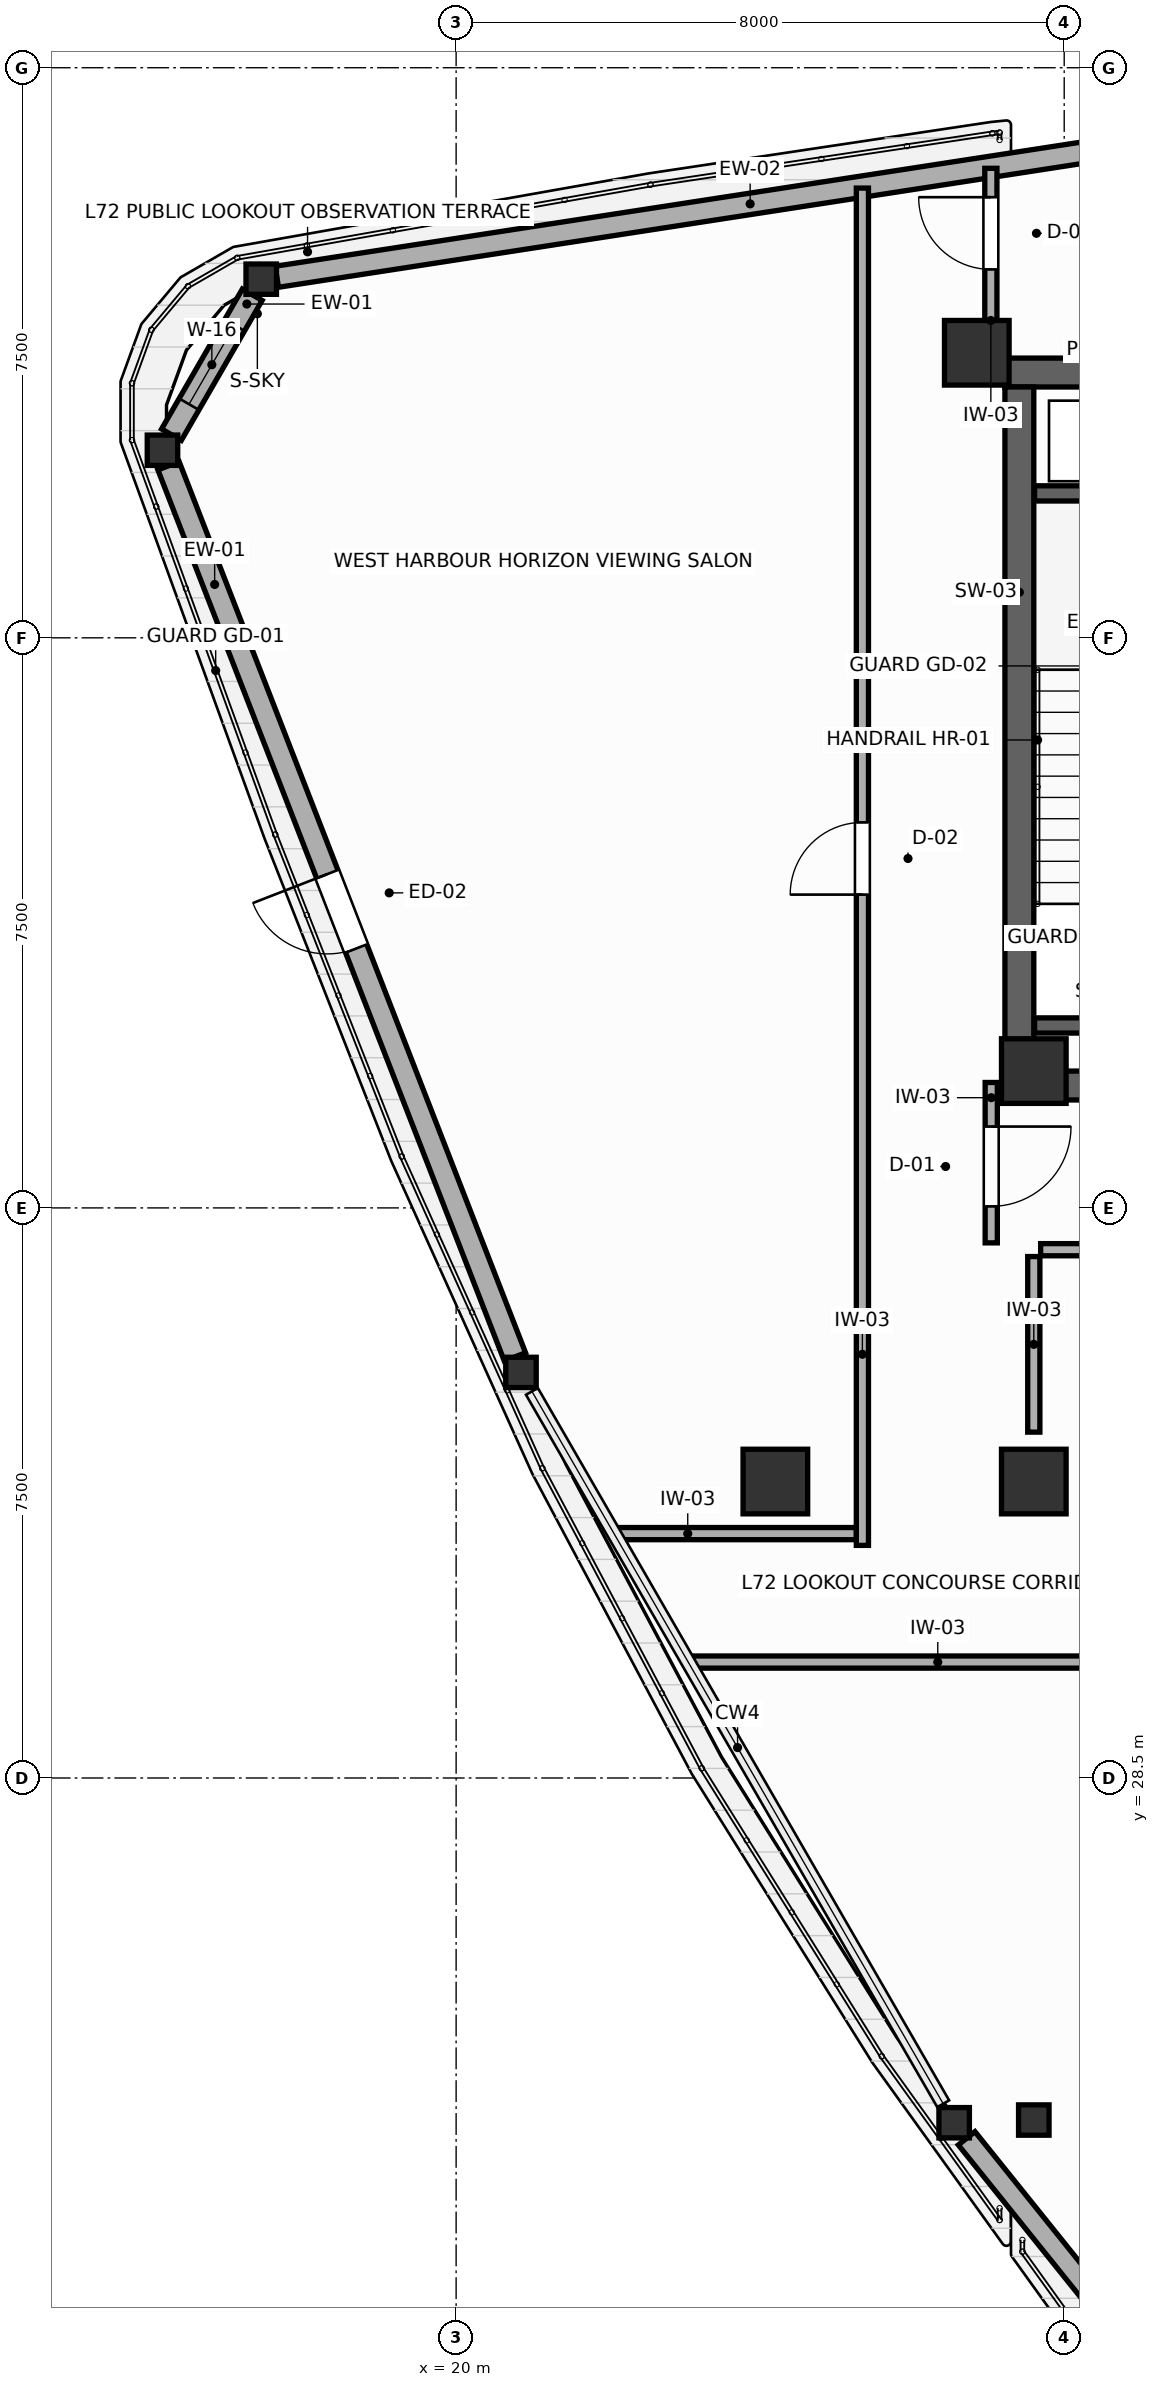
"""IFC4 building model, lengths in metres.
Left out: names, types, materials, properties, quantities, classifications, styles, units other than length and angle.
Written with IfcOpenShell. Run it as: python <this file> out.ifc"""

import sys

from ifc_helpers import new_model, si_unit, direction, frame, frame_2d, origin, origin_2d, place, context, subcontext, project, spatial, rectangle, i_section, extrude, source, transform, mapped, element, fill, save


model = new_model("IFC4")
c1 = context("Model", 3, precision=1e-05, world=origin(), true_north=direction((0.0, 1.0)))
c2 = subcontext(c1, "Body", "Model", "MODEL_VIEW")
j1 = project(units=[si_unit("LENGTHUNIT", "METRE"), si_unit("PLANEANGLEUNIT", "RADIAN")], contexts=[c1])
p1 = place(None, origin())
s1 = spatial("IfcSite", under=j1, at=p1, CompositionType="ELEMENT")
p2 = place(p1, origin())
s2 = spatial("IfcBuilding", under=s1, at=p2, CompositionType="ELEMENT")
p3 = place(p2, frame((0.0, 0.0, 275.4)))
s3 = spatial("IfcBuildingStorey", under=s2, at=p3, CompositionType="ELEMENT", Elevation=275.4)
p4 = place(p3, frame((27.22, 46.99, 0.0), z_axis=(0.0, 0.0, 1.0), x_axis=(1.0, 0.0, 0.0)))
e1 = element("IfcWall", 1, at=p4, inside=s3, PredefinedType="SHEAR", context=c2, shape_type="SweptSolid", body=[
    extrude(rectangle(XDim=17.56, YDim=0.38, at=frame_2d((8.78, 0.0))), origin(), (0.0, 0.0, 1.0), 4.2),
])
p5 = place(p3, frame((27.22, 37.61, 0.0), z_axis=(0.0, 0.0, 1.0), x_axis=(1.0, 0.0, 0.0)))
e2 = element("IfcWall", 2, at=p5, inside=s3, PredefinedType="SHEAR", context=c2, shape_type="SweptSolid", body=[
    extrude(rectangle(XDim=17.56, YDim=0.38, at=frame_2d((8.78, 0.0))), origin(), (0.0, 0.0, 1.0), 4.2),
])
p6 = place(p5, frame((4.805, 0.0, 0.0)))
e3 = element("IfcOpeningElement", 3, at=p6, cuts=e2, PredefinedType="OPENING", context=c2, shape_type="SweptSolid", body=[
    extrude(rectangle(XDim=1.05, YDim=2.1, at=frame_2d((0.525, 1.05))), frame((0.0, 0.2, 0.0), z_axis=(0.0, -1.0, 0.0), x_axis=(1.0, 0.0, 0.0)), (0.0, 0.0, 1.0), 0.4),
])
p7 = place(p5, frame((11.705, 0.0, 0.0)))
e4 = element("IfcOpeningElement", 4, at=p7, cuts=e2, PredefinedType="OPENING", context=c2, shape_type="SweptSolid", body=[
    extrude(rectangle(XDim=1.05, YDim=2.1, at=frame_2d((0.525, 1.05))), frame((0.0, 0.2, 0.0), z_axis=(0.0, -1.0, 0.0), x_axis=(1.0, 0.0, 0.0)), (0.0, 0.0, 1.0), 0.4),
])
p8 = place(p3, frame((27.41, 37.8, 0.0), z_axis=(0.0, 0.0, 1.0), x_axis=(0.0, 1.0, 0.0)))
e5 = element("IfcWall", 5, at=p8, inside=s3, PredefinedType="SHEAR", context=c2, shape_type="SweptSolid", body=[
    extrude(rectangle(XDim=9.0, YDim=0.38, at=frame_2d((4.5, 0.0))), origin(), (0.0, 0.0, 1.0), 4.2),
])
m1 = source(origin(), c2, "Body", "SweptSolid", [
    extrude(rectangle(XDim=0.85, YDim=0.85, at=origin_2d()), origin(), (0.0, 0.0, 1.0), 4.2),
])
for number, where, z_axis, x_axis in (
    (6, (26.85, 47.25, 0.0), (0.0, 0.0, 1.0), (1.0, 0.0, 0.0)),
    (7, (27.6, 37.8, 0.0), (0.0, 0.0, 1.0), (1.0, 0.0, 0.0)),
    (8, (27.6, 32.4, 0.0), (0.0, 0.0, 1.0), (1.0, 0.0, 0.0)),
    (9, (24.2, 32.4, 0.0), (0.0, 0.0, 1.0), (1.0, 0.0, 0.0)),
):
    element("IfcColumn", number, at=place(p3, frame(where, z_axis=z_axis, x_axis=x_axis)), inside=s3, PredefinedType="COLUMN", context=c2, shape_type="MappedRepresentation", body=[
        mapped(m1, transform((0.0, 0.0, 0.0), scale=1.0)),
    ])
m2 = source(origin(), c2, "Body", "SweptSolid", [
    extrude(i_section(OverallWidth=0.401, OverallDepth=0.399, WebThickness=0.022, FlangeThickness=0.036, FilletRadius=0.015, at=origin_2d()), origin(), (0.0, 0.0, 1.0), 4.2),
])
for number, where, z_axis, x_axis in (
    (10, (27.6, 24.0, 0.0), (0.0, 0.0, 1.0), (1.0, 0.0, 0.0)),
    (11, (17.436, 48.218, 0.0), (0.0, 0.0, 1.0), (1.0, 0.0, 0.0)),
    (12, (16.137, 45.968, 0.0), (0.0, 0.0, 1.0), (1.0, 0.0, 0.0)),
    (13, (20.853, 33.836, 0.0), (0.0, 0.0, 1.0), (1.0, 0.0, 0.0)),
    (14, (26.552, 23.965, 0.0), (0.0, 0.0, 1.0), (1.0, 0.0, 0.0)),
):
    element("IfcColumn", number, at=place(p3, frame(where, z_axis=z_axis, x_axis=x_axis)), inside=s3, PredefinedType="COLUMN", context=c2, shape_type="MappedRepresentation", body=[
        mapped(m2, transform((0.0, 0.0, 0.0), scale=1.0)),
    ])
p9 = place(p3, frame((30.095, 50.168, 0.0), z_axis=(0.0, 0.0, 1.0), x_axis=(-0.988345027655, -0.152230438186, 0.0)))
e15 = element("IfcWall", 15, at=p9, inside=s3, PredefinedType="SOLIDWALL", context=c2, shape_type="SweptSolid", body=[
    extrude(rectangle(XDim=12.601, YDim=0.28, at=frame_2d((6.3, 0.0))), origin(), (0.0, 0.0, 1.0), 2.52),
])
p10 = place(p3, frame((17.318, 48.014, 0.0), z_axis=(0.0, 0.0, 1.0), x_axis=(-0.499967640965, -0.866044085476, 0.0)))
e16 = element("IfcWall", 16, at=p10, inside=s3, PredefinedType="SOLIDWALL", context=c2, shape_type="SweptSolid", body=[
    extrude(rectangle(XDim=2.126, YDim=0.3, at=frame_2d((1.063, 0.0))), origin(), (0.0, 0.0, 1.0), 2.52),
])
p11 = place(p10, frame((0.463, 0.0, 0.75)))
e17 = element("IfcOpeningElement", 17, at=p11, cuts=e16, PredefinedType="OPENING", context=c2, shape_type="SweptSolid", body=[
    extrude(rectangle(XDim=1.2, YDim=1.55, at=frame_2d((0.6, 0.775))), frame((0.0, 0.16, 0.0), z_axis=(0.0, -1.0, 0.0), x_axis=(1.0, 0.0, 0.0)), (0.0, 0.0, 1.0), 0.32),
])
p12 = place(p3, frame((16.216, 45.763, 0.0), z_axis=(0.0, 0.0, 1.0), x_axis=(0.362340410402, -0.932045828803, 0.0)))
e18 = element("IfcWall", 18, at=p12, inside=s3, PredefinedType="SOLIDWALL", context=c2, shape_type="SweptSolid", body=[
    extrude(rectangle(XDim=12.578, YDim=0.3, at=frame_2d((6.289, 0.0))), origin(), (0.0, 0.0, 1.0), 2.52),
])
p13 = place(p12, frame((5.764, 0.0, 0.0)))
e19 = element("IfcOpeningElement", 19, at=p13, cuts=e18, PredefinedType="OPENING", context=c2, shape_type="SweptSolid", body=[
    extrude(rectangle(XDim=1.05, YDim=2.1, at=frame_2d((0.525, 1.05))), frame((0.0, 0.16, 0.0), z_axis=(0.0, -1.0, 0.0), x_axis=(1.0, 0.0, 0.0)), (0.0, 0.0, 1.0), 0.32),
])
p14 = place(p3, frame((26.716, 23.76, 0.0), z_axis=(0.0, 0.0, 1.0), x_axis=(0.626009756129, -0.779815225058, 0.0)))
e20 = element("IfcWall", 20, at=p14, inside=s3, PredefinedType="SOLIDWALL", context=c2, shape_type="SweptSolid", body=[
    extrude(rectangle(XDim=12.492, YDim=0.28, at=frame_2d((6.246, 0.0))), origin(), (0.0, 0.0, 1.0), 2.52),
])
for number, where, z_axis, x_axis in (
    (21, (27.61, 45.4, 0.0), (0.0, 0.0, 1.0), (1.0, 0.0, 0.0)),
    (22, (27.61, 38.4, 0.0), (0.0, 0.0, 1.0), (1.0, 0.0, 0.0)),
):
    element("IfcWall", number, at=place(p3, frame(where, z_axis=z_axis, x_axis=x_axis)), inside=s3, PredefinedType="SHEAR", context=c2, shape_type="SweptSolid", body=[
        extrude(rectangle(XDim=3.14, YDim=0.2, at=frame_2d((1.57, 0.0))), origin(), (0.0, 0.0, 1.0), 4.2),
    ])
p15 = place(p3, frame((27.6, 33.05, 0.0), z_axis=(0.0, 0.0, 1.0), x_axis=(0.0, 1.0, 0.0)))
e23 = element("IfcWall", 23, at=p15, inside=s3, PredefinedType="PARTITIONING", context=c2, shape_type="SweptSolid", body=[
    extrude(rectangle(XDim=2.31, YDim=0.16, at=frame_2d((1.155, 0.0))), origin(), (0.0, 0.0, 1.0), 3.96),
])
p16 = place(p3, frame((27.69, 35.45, 0.0), z_axis=(0.0, 0.0, 1.0), x_axis=(1.0, 0.0, 0.0)))
e24 = element("IfcWall", 24, at=p16, inside=s3, PredefinedType="PARTITIONING", context=c2, shape_type="SweptSolid", body=[
    extrude(rectangle(XDim=4.03, YDim=0.16, at=frame_2d((2.015, 0.0))), origin(), (0.0, 0.0, 1.0), 3.96),
])
p17 = place(p16, frame((1.35, 0.0, 0.0)))
e25 = element("IfcOpeningElement", 25, at=p17, cuts=e24, PredefinedType="OPENING", context=c2, shape_type="SweptSolid", body=[
    extrude(rectangle(XDim=0.95, YDim=2.05, at=frame_2d((0.475, 1.025))), frame((0.0, 0.09, 0.0), z_axis=(0.0, -1.0, 0.0), x_axis=(1.0, 0.0, 0.0)), (0.0, 0.0, 1.0), 0.18),
])
p18 = place(p3, frame((27.04, 35.54, 0.0), z_axis=(0.0, 0.0, 1.0), x_axis=(0.0, 1.0, 0.0)))
e26 = element("IfcWall", 26, at=p18, inside=s3, PredefinedType="PARTITIONING", context=c2, shape_type="SweptSolid", body=[
    extrude(rectangle(XDim=2.11, YDim=0.16, at=frame_2d((1.055, 0.0))), origin(), (0.0, 0.0, 1.0), 3.96),
])
p19 = place(p18, frame((0.48, 0.0, 0.0)))
e27 = element("IfcOpeningElement", 27, at=p19, cuts=e26, PredefinedType="OPENING", context=c2, shape_type="SweptSolid", body=[
    extrude(rectangle(XDim=1.05, YDim=2.1, at=frame_2d((0.525, 1.05))), frame((0.0, 0.09, 0.0), z_axis=(0.0, -1.0, 0.0), x_axis=(1.0, 0.0, 0.0)), (0.0, 0.0, 1.0), 0.18),
])
p20 = place(p3, frame((25.345, 31.56, 0.0), z_axis=(0.0, 0.0, 1.0), x_axis=(0.0, 1.0, 0.0)))
e28 = element("IfcWall", 28, at=p20, inside=s3, PredefinedType="PARTITIONING", context=c2, shape_type="SweptSolid", body=[
    extrude(rectangle(XDim=17.856, YDim=0.16, at=frame_2d((8.928, 0.0))), origin(), (0.0, 0.0, 1.0), 3.96),
])
p21 = place(p20, frame((8.562, 0.0, 0.0)))
e29 = element("IfcOpeningElement", 29, at=p21, cuts=e28, PredefinedType="OPENING", context=c2, shape_type="SweptSolid", body=[
    extrude(rectangle(XDim=0.95, YDim=2.05, at=frame_2d((0.475, 1.025))), frame((0.0, 0.09, 0.0), z_axis=(0.0, -1.0, 0.0), x_axis=(1.0, 0.0, 0.0)), (0.0, 0.0, 1.0), 0.18),
])
p22 = place(p3, frame((23.073, 30.025, 0.0), z_axis=(0.0, 0.0, 1.0), x_axis=(1.0, 0.0, 0.0)))
e30 = element("IfcWall", 30, at=p22, inside=s3, PredefinedType="PARTITIONING", context=c2, shape_type="SweptSolid", body=[
    extrude(rectangle(XDim=8.037, YDim=0.16, at=frame_2d((4.019, 0.0))), origin(), (0.0, 0.0, 1.0), 3.96),
])
p23 = place(p22, frame((6.707, 0.0, 0.0)))
e31 = element("IfcOpeningElement", 31, at=p23, cuts=e30, PredefinedType="OPENING", context=c2, shape_type="SweptSolid", body=[
    extrude(rectangle(XDim=0.95, YDim=2.05, at=frame_2d((0.475, 1.025))), frame((0.0, 0.09, 0.0), z_axis=(0.0, -1.0, 0.0), x_axis=(1.0, 0.0, 0.0)), (0.0, 0.0, 1.0), 0.18),
])
p24 = place(p3, frame((22.097, 31.715, 0.0), z_axis=(0.0, 0.0, 1.0), x_axis=(1.0, 0.0, 0.0)))
e32 = element("IfcWall", 32, at=p24, inside=s3, PredefinedType="PARTITIONING", context=c2, shape_type="SweptSolid", body=[
    extrude(rectangle(XDim=3.166, YDim=0.16, at=frame_2d((1.583, 0.0))), origin(), (0.0, 0.0, 1.0), 3.96),
])
p25 = place(p3, frame((27.035, 47.183, 0.0), z_axis=(0.0, 0.0, 1.0), x_axis=(0.0, 1.0, 0.0)))
e33 = element("IfcWall", 33, at=p25, inside=s3, PredefinedType="PARTITIONING", context=c2, shape_type="SweptSolid", body=[
    extrude(rectangle(XDim=2.494, YDim=0.16, at=frame_2d((1.247, 0.0))), origin(), (0.0, 0.0, 1.0), 3.96),
])
p26 = place(p25, frame((1.164, 0.0, 0.0)))
e34 = element("IfcOpeningElement", 34, at=p26, cuts=e33, PredefinedType="OPENING", context=c2, shape_type="SweptSolid", body=[
    extrude(rectangle(XDim=0.95, YDim=2.05, at=frame_2d((0.475, 1.025))), frame((0.0, 0.09, 0.0), z_axis=(0.0, -1.0, 0.0), x_axis=(1.0, 0.0, 0.0)), (0.0, 0.0, 1.0), 0.18),
])
p27 = place(p11, origin())
e35 = element("IfcWindow", 35, at=p27, inside=s3, PartitioningType="SINGLE_PANEL", PredefinedType="WINDOW", context=c2, shape_type="SweptSolid", body=[
    extrude(rectangle(XDim=1.2, YDim=1.55, at=frame_2d((0.6, 0.775))), frame((0.0, 0.03, 0.0), z_axis=(0.0, -1.0, 0.0), x_axis=(1.0, 0.0, 0.0)), (0.0, 0.0, 1.0), 0.06),
])
fill(e17, e35)
p28 = place(p13, frame((1.05, 0.0, 0.0), z_axis=(0.0, 0.0, 1.0), x_axis=(-1.0, 0.0, 0.0)))
e36 = element("IfcDoor", 36, at=p28, inside=s3, OperationType="SINGLE_SWING_RIGHT", PredefinedType="DOOR", context=c2, shape_type="SweptSolid", body=[
    extrude(rectangle(XDim=1.05, YDim=2.1, at=frame_2d((0.525, 1.05))), frame((0.0, 0.025, 0.0), z_axis=(0.0, -1.0, 0.0), x_axis=(1.0, 0.0, 0.0)), (0.0, 0.0, 1.0), 0.05),
])
fill(e19, e36)
p29 = place(p19, frame((1.05, 0.0, 0.0), z_axis=(0.0, 0.0, 1.0), x_axis=(-1.0, 0.0, 0.0)))
e37 = element("IfcDoor", 37, at=p29, inside=s3, OperationType="SINGLE_SWING_LEFT", PredefinedType="DOOR", context=c2, shape_type="SweptSolid", body=[
    extrude(rectangle(XDim=1.05, YDim=2.1, at=frame_2d((0.525, 1.05))), frame((0.0, 0.025, 0.0), z_axis=(0.0, -1.0, 0.0), x_axis=(1.0, 0.0, 0.0)), (0.0, 0.0, 1.0), 0.05),
])
fill(e27, e37)
p30 = place(p21, origin())
e38 = element("IfcDoor", 38, at=p30, inside=s3, OperationType="SINGLE_SWING_LEFT", PredefinedType="DOOR", context=c2, shape_type="SweptSolid", body=[
    extrude(rectangle(XDim=0.95, YDim=2.05, at=frame_2d((0.475, 1.025))), frame((0.0, 0.025, 0.0), z_axis=(0.0, -1.0, 0.0), x_axis=(1.0, 0.0, 0.0)), (0.0, 0.0, 1.0), 0.05),
])
fill(e29, e38)
p31 = place(p26, origin())
e39 = element("IfcDoor", 39, at=p31, inside=s3, OperationType="SINGLE_SWING_RIGHT", PredefinedType="DOOR", context=c2, shape_type="SweptSolid", body=[
    extrude(rectangle(XDim=0.95, YDim=2.05, at=frame_2d((0.475, 1.025))), frame((0.0, 0.025, 0.0), z_axis=(0.0, -1.0, 0.0), x_axis=(1.0, 0.0, 0.0)), (0.0, 0.0, 1.0), 0.05),
])
fill(e34, e39)
save(model, sys.argv[1])
